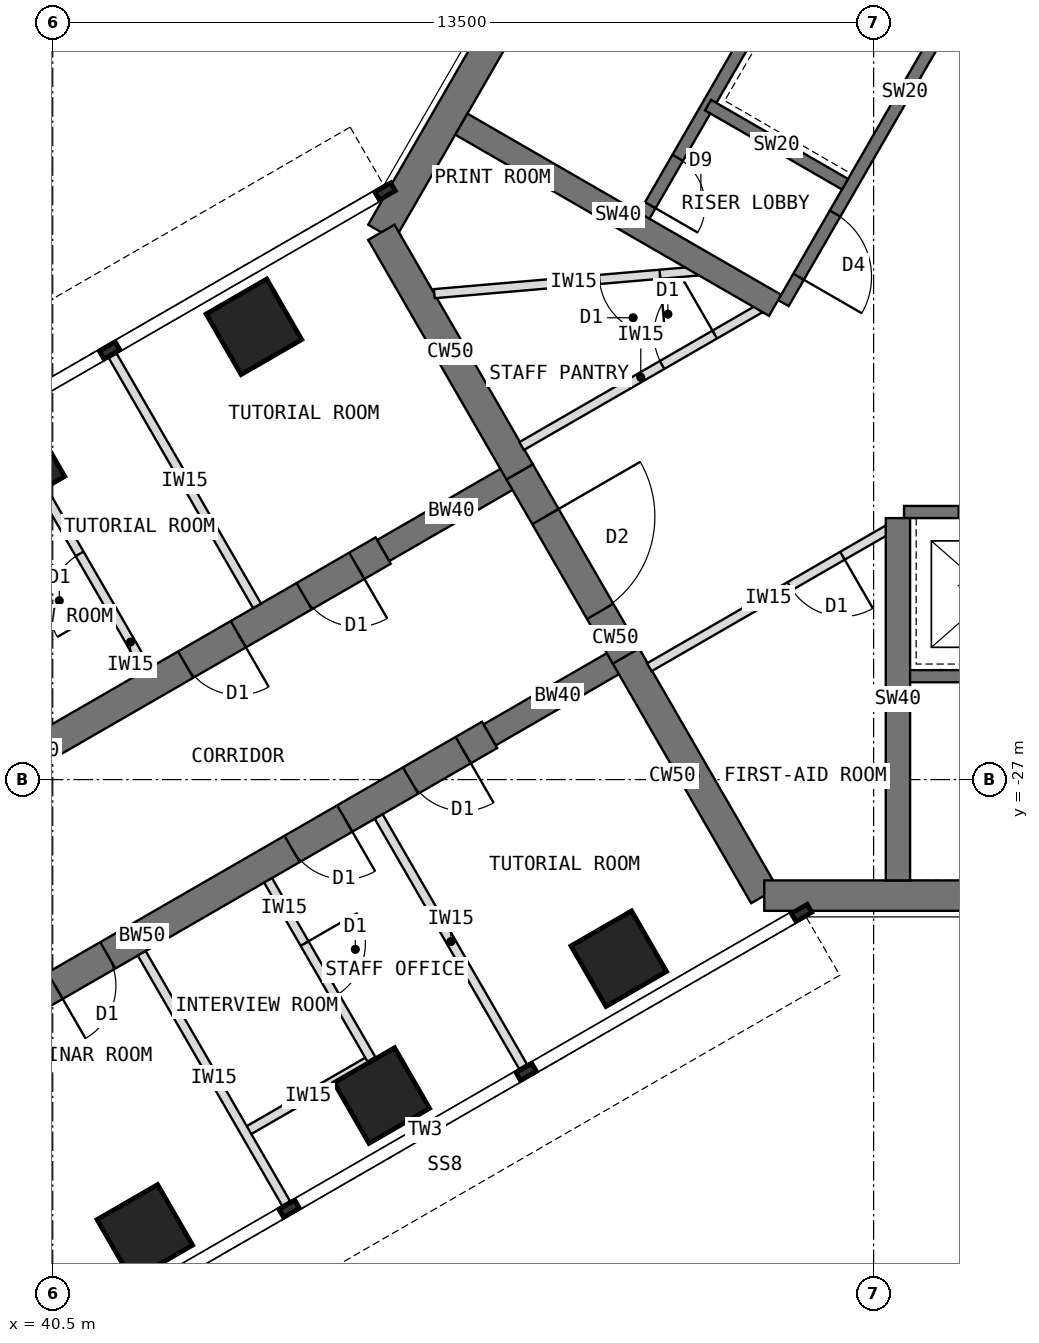
"""IFC4 building model, lengths in metres.
Left out: names, types, materials, properties, quantities, classifications, styles, units other than length and angle.
Written with IfcOpenShell. Run it as: python <this file> out.ifc"""

import sys

from ifc_helpers import new_model, si_unit, direction, frame, frame_2d, origin, origin_2d, place, context, subcontext, project, spatial, rectangle, extrude, element, fill, save


model = new_model("IFC4")
c1 = context("Model", 3, precision=1e-05, world=origin(), true_north=direction((0.0, 1.0)))
c2 = subcontext(c1, "Body", "Model", "MODEL_VIEW")
j1 = project(units=[si_unit("LENGTHUNIT", "METRE"), si_unit("PLANEANGLEUNIT", "RADIAN")], contexts=[c1])
p1 = place(None, origin())
s1 = spatial("IfcSite", under=j1, at=p1, CompositionType="ELEMENT")
p2 = place(p1, origin())
s2 = spatial("IfcBuilding", under=s1, at=p2, CompositionType="ELEMENT")
p3 = place(p2, frame((0.0, 0.0, 206.5)))
s3 = spatial("IfcBuildingStorey", under=s2, at=p3, CompositionType="ELEMENT", Elevation=206.5)
p4 = place(p3, frame((52.202, -7.092, 0.0), z_axis=(0.0, 0.0, 1.0), x_axis=(-0.500005998175, -0.866021940709, 0.0)))
e1 = element("IfcWall", 1, at=p4, inside=s3, PredefinedType="SHEAR", context=c2, shape_type="SweptSolid", body=[
    extrude(rectangle(XDim=12.596, YDim=0.5, at=frame_2d((6.298, 0.0))), origin(), (0.0, 0.0, 1.0), 4.0),
])
p5 = place(p3, frame((45.904, -18.0, 0.0), z_axis=(0.0, 0.0, 1.0), x_axis=(0.500024481964, -0.866011268655, 0.0)))
e2 = element("IfcWall", 2, at=p5, inside=s3, PredefinedType="SHEAR", context=c2, shape_type="SweptSolid", body=[
    extrude(rectangle(XDim=4.548, YDim=0.5, at=frame_2d((2.274, 0.0))), origin(), (0.0, 0.0, 1.0), 4.0),
])
p6 = place(p3, frame((48.178, -21.939, 0.0), z_axis=(0.0, 0.0, 1.0), x_axis=(0.500010275428, -0.866019471182, 0.0)))
e3 = element("IfcWall", 3, at=p6, inside=s3, PredefinedType="SHEAR", context=c2, shape_type="SweptSolid", body=[
    extrude(rectangle(XDim=3.5, YDim=0.5, at=frame_2d((1.75, 0.0))), origin(), (0.0, 0.0, 1.0), 4.0),
])
p7 = place(p6, frame((0.85, 0.0, 0.0)))
e4 = element("IfcOpeningElement", 4, at=p7, cuts=e3, PredefinedType="OPENING", context=c2, shape_type="SweptSolid", body=[
    extrude(rectangle(XDim=1.8, YDim=2.1, at=frame_2d((0.9, 1.05))), frame((0.0, 0.26, 0.0), z_axis=(0.0, -1.0, 0.0), x_axis=(1.0, 0.0, 0.0)), (0.0, 0.0, 1.0), 0.52),
])
p8 = place(p3, frame((49.928, -24.97, 0.0), z_axis=(0.0, 0.0, 1.0), x_axis=(0.499984222037, -0.866034513004, 0.0)))
e5 = element("IfcWall", 5, at=p8, inside=s3, PredefinedType="SHEAR", context=c2, shape_type="SweptSolid", body=[
    extrude(rectangle(XDim=4.548, YDim=0.5, at=frame_2d((2.274, 0.0))), origin(), (0.0, 0.0, 1.0), 4.0),
])
p9 = place(p3, frame((52.202, -28.908, 0.0), z_axis=(0.0, 0.0, 1.0), x_axis=(1.0, 0.0, 0.0)))
e6 = element("IfcWall", 6, at=p9, inside=s3, PredefinedType="SHEAR", context=c2, shape_type="SweptSolid", body=[
    extrude(rectangle(XDim=12.596, YDim=0.5, at=frame_2d((6.298, 0.0))), origin(), (0.0, 0.0, 1.0), 4.0),
])
p10 = place(p3, frame((49.928, -24.97, 0.0), z_axis=(0.0, 0.0, 1.0), x_axis=(-0.866031863473, -0.499988811324, 0.0)))
e7 = element("IfcWall", 7, at=p10, inside=s3, PredefinedType="SHEAR", context=c2, shape_type="SweptSolid", body=[
    extrude(rectangle(XDim=2.592, YDim=0.4, at=frame_2d((1.296, 0.0))), origin(), (0.0, 0.0, 1.0), 4.0),
])
p11 = place(p3, frame((47.684, -26.266, 0.0), z_axis=(0.0, 0.0, 1.0), x_axis=(-0.866027579429, -0.499996231654, 0.0)))
e8 = element("IfcWall", 8, at=p11, inside=s3, PredefinedType="SHEAR", context=c2, shape_type="SweptSolid", body=[
    extrude(rectangle(XDim=13.2, YDim=0.5, at=frame_2d((6.6, 0.0))), origin(), (0.0, 0.0, 1.0), 4.0),
])
p12 = place(p11, frame((0.5, 0.0, 0.0)))
e9 = element("IfcOpeningElement", 9, at=p12, cuts=e8, PredefinedType="OPENING", context=c2, shape_type="SweptSolid", body=[
    extrude(rectangle(XDim=1.0, YDim=2.1, at=frame_2d((0.5, 1.05))), frame((0.0, 0.26, 0.0), z_axis=(0.0, -1.0, 0.0), x_axis=(1.0, 0.0, 0.0)), (0.0, 0.0, 1.0), 0.52),
])
p13 = place(p11, frame((2.75, 0.0, 0.0)))
e10 = element("IfcOpeningElement", 10, at=p13, cuts=e8, PredefinedType="OPENING", context=c2, shape_type="SweptSolid", body=[
    extrude(rectangle(XDim=1.0, YDim=2.1, at=frame_2d((0.5, 1.05))), frame((0.0, 0.26, 0.0), z_axis=(0.0, -1.0, 0.0), x_axis=(1.0, 0.0, 0.0)), (0.0, 0.0, 1.0), 0.52),
])
p14 = place(p11, frame((7.25, 0.0, 0.0)))
e11 = element("IfcOpeningElement", 11, at=p14, cuts=e8, PredefinedType="OPENING", context=c2, shape_type="SweptSolid", body=[
    extrude(rectangle(XDim=1.0, YDim=2.1, at=frame_2d((0.5, 1.05))), frame((0.0, 0.26, 0.0), z_axis=(0.0, -1.0, 0.0), x_axis=(1.0, 0.0, 0.0)), (0.0, 0.0, 1.0), 0.52),
])
p15 = place(p3, frame((48.178, -21.939, 0.0), z_axis=(0.0, 0.0, 1.0), x_axis=(-0.866072649678, -0.499918158782, 0.0)))
e12 = element("IfcWall", 12, at=p15, inside=s3, PredefinedType="SHEAR", context=c2, shape_type="SweptSolid", body=[
    extrude(rectangle(XDim=2.592, YDim=0.4, at=frame_2d((1.296, 0.0))), origin(), (0.0, 0.0, 1.0), 4.0),
])
p16 = place(p3, frame((45.934, -23.234, 0.0), z_axis=(0.0, 0.0, 1.0), x_axis=(-0.866019570528, -0.500010103361, 0.0)))
e13 = element("IfcWall", 13, at=p16, inside=s3, PredefinedType="SHEAR", context=c2, shape_type="SweptSolid", body=[
    extrude(rectangle(XDim=13.2, YDim=0.5, at=frame_2d((6.6, 0.0))), origin(), (0.0, 0.0, 1.0), 4.0),
])
p17 = place(p16, frame((0.5, 0.0, 0.0)))
e14 = element("IfcOpeningElement", 14, at=p17, cuts=e13, PredefinedType="OPENING", context=c2, shape_type="SweptSolid", body=[
    extrude(rectangle(XDim=1.0, YDim=2.1, at=frame_2d((0.5, 1.05))), frame((0.0, 0.26, 0.0), z_axis=(0.0, -1.0, 0.0), x_axis=(1.0, 0.0, 0.0)), (0.0, 0.0, 1.0), 0.52),
])
p18 = place(p16, frame((2.75, 0.0, 0.0)))
e15 = element("IfcOpeningElement", 15, at=p18, cuts=e13, PredefinedType="OPENING", context=c2, shape_type="SweptSolid", body=[
    extrude(rectangle(XDim=1.0, YDim=2.1, at=frame_2d((0.5, 1.05))), frame((0.0, 0.26, 0.0), z_axis=(0.0, -1.0, 0.0), x_axis=(1.0, 0.0, 0.0)), (0.0, 0.0, 1.0), 0.52),
])
p19 = place(p16, frame((7.25, 0.0, 0.0)))
e16 = element("IfcOpeningElement", 16, at=p19, cuts=e13, PredefinedType="OPENING", context=c2, shape_type="SweptSolid", body=[
    extrude(rectangle(XDim=1.0, YDim=2.1, at=frame_2d((0.5, 1.05))), frame((0.0, 0.26, 0.0), z_axis=(0.0, -1.0, 0.0), x_axis=(1.0, 0.0, 0.0)), (0.0, 0.0, 1.0), 0.52),
])
for number, where, z_axis, x_axis in (
    (17, (49.809, -29.946, 0.0), (0.0, 0.0, 1.0), (0.866, 0.5, 0.0)),
    (18, (43.809, -19.554, 0.0), (0.0, 0.0, 1.0), (0.866, 0.5, 0.0)),
    (19, (45.912, -32.196, 0.0), (0.0, 0.0, 1.0), (0.866, 0.5, 0.0)),
    (20, (39.912, -21.804, 0.0), (0.0, 0.0, 1.0), (0.866, 0.5, 0.0)),
    (21, (42.014, -34.446, 0.0), (0.0, 0.0, 1.0), (0.866, 0.5, 0.0)),
):
    element("IfcColumn", number, at=place(p3, frame(where, z_axis=z_axis, x_axis=x_axis)), inside=s3, PredefinedType="COLUMN", context=c2, shape_type="SweptSolid", body=[
        extrude(rectangle(XDim=1.15, YDim=1.15, at=origin_2d()), origin(), (0.0, 0.0, 1.0), 4.0),
    ])
p20 = place(p3, frame((40.433, -36.456, 0.0), z_axis=(0.0, 0.0, 1.0), x_axis=(-0.500046648681, 0.865998469481, 0.0)))
e22 = element("IfcWall", 22, at=p20, inside=s3, PredefinedType="STANDARD", context=c2, shape_type="SweptSolid", body=[
    extrude(rectangle(XDim=2.325, YDim=0.25, at=frame_2d((1.163, 0.0))), origin(), (0.0, 0.0, 1.0), 3.8),
])
p21 = place(p3, frame((56.516, -12.236, 0.0), z_axis=(0.0, 0.0, 1.0), x_axis=(-0.49999894854, -0.866026010844, 0.0)))
e23 = element("IfcWall", 23, at=p21, inside=s3, PredefinedType="SHEAR", context=c2, shape_type="SweptSolid", body=[
    extrude(rectangle(XDim=8.0, YDim=0.2, at=frame_2d((4.0, 0.0))), origin(), (0.0, 0.0, 1.0), 4.0),
])
p22 = place(p21, frame((6.3, 0.0, 0.0)))
e24 = element("IfcOpeningElement", 24, at=p22, cuts=e23, PredefinedType="OPENING", context=c2, shape_type="SweptSolid", body=[
    extrude(rectangle(XDim=1.2, YDim=2.1, at=frame_2d((0.6, 1.05))), frame((0.0, 0.11, 0.0), z_axis=(0.0, -1.0, 0.0), x_axis=(1.0, 0.0, 0.0)), (0.0, 0.0, 1.0), 0.22),
])
p23 = place(p3, frame((53.53, -17.209, 0.0), z_axis=(0.0, 0.0, 1.0), x_axis=(-0.866062058628, 0.499936506574, 0.0)))
e25 = element("IfcWall", 25, at=p23, inside=s3, PredefinedType="SHEAR", context=c2, shape_type="SweptSolid", body=[
    extrude(rectangle(XDim=2.6, YDim=0.2, at=frame_2d((1.3, 0.0))), origin(), (0.0, 0.0, 1.0), 4.0),
])
p24 = place(p3, frame((54.178, -10.886, 0.0), z_axis=(0.0, 0.0, 1.0), x_axis=(-0.49999894854, -0.866026010844, 0.0)))
e26 = element("IfcWall", 26, at=p24, inside=s3, PredefinedType="SHEAR", context=c2, shape_type="SweptSolid", body=[
    extrude(rectangle(XDim=8.0, YDim=0.2, at=frame_2d((4.0, 0.0))), origin(), (0.0, 0.0, 1.0), 4.0),
])
p25 = place(p24, frame((6.8, 0.0, 0.0)))
e27 = element("IfcOpeningElement", 27, at=p25, cuts=e26, PredefinedType="OPENING", context=c2, shape_type="SweptSolid", body=[
    extrude(rectangle(XDim=0.9, YDim=2.1, at=frame_2d((0.45, 1.05))), frame((0.0, 0.11, 0.0), z_axis=(0.0, -1.0, 0.0), x_axis=(1.0, 0.0, 0.0)), (0.0, 0.0, 1.0), 0.22),
])
p26 = place(p3, frame((52.38, -19.201, 0.0), z_axis=(0.0, 0.0, 1.0), x_axis=(-0.866012946976, 0.500021575205, 0.0)))
e28 = element("IfcWall", 28, at=p26, inside=s3, PredefinedType="SHEAR", context=c2, shape_type="SweptSolid", body=[
    extrude(rectangle(XDim=5.958, YDim=0.4, at=frame_2d((2.979, 0.0))), origin(), (0.0, 0.0, 1.0), 4.0),
])
p27 = place(p3, frame((54.5, -22.6, 0.0), z_axis=(0.0, 0.0, 1.0), x_axis=(1.0, 0.0, 0.0)))
e29 = element("IfcWall", 29, at=p27, inside=s3, PredefinedType="SHEAR", context=c2, shape_type="SweptSolid", body=[
    extrude(rectangle(XDim=8.0, YDim=0.2, at=frame_2d((4.0, 0.0))), origin(), (0.0, 0.0, 1.0), 4.0),
])
p28 = place(p27, frame((6.3, 0.0, 0.0)))
e30 = element("IfcOpeningElement", 30, at=p28, cuts=e29, PredefinedType="OPENING", context=c2, shape_type="SweptSolid", body=[
    extrude(rectangle(XDim=1.2, YDim=2.1, at=frame_2d((0.6, 1.05))), frame((0.0, 0.11, 0.0), z_axis=(0.0, -1.0, 0.0), x_axis=(1.0, 0.0, 0.0)), (0.0, 0.0, 1.0), 0.22),
])
p29 = place(p27, frame((0.9, 0.0, 0.0)))
e31 = element("IfcOpeningElement", 31, at=p29, cuts=e29, PredefinedType="OPENING", context=c2, shape_type="SweptSolid", body=[
    extrude(rectangle(XDim=1.1, YDim=2.2, at=frame_2d((0.55, 1.1))), frame((0.0, 0.11, 0.0), z_axis=(0.0, -1.0, 0.0), x_axis=(1.0, 0.0, 0.0)), (0.0, 0.0, 1.0), 0.22),
])
p30 = place(p3, frame((54.5, -25.3, 0.0), z_axis=(0.0, 0.0, 1.0), x_axis=(1.0, 0.0, 0.0)))
e32 = element("IfcWall", 32, at=p30, inside=s3, PredefinedType="SHEAR", context=c2, shape_type="SweptSolid", body=[
    extrude(rectangle(XDim=8.0, YDim=0.2, at=frame_2d((4.0, 0.0))), origin(), (0.0, 0.0, 1.0), 4.0),
])
p31 = place(p30, frame((6.7, 0.0, 0.0)))
e33 = element("IfcOpeningElement", 33, at=p31, cuts=e32, PredefinedType="OPENING", context=c2, shape_type="SweptSolid", body=[
    extrude(rectangle(XDim=1.1, YDim=2.1, at=frame_2d((0.55, 1.05))), frame((0.0, 0.11, 0.0), z_axis=(0.0, -1.0, 0.0), x_axis=(1.0, 0.0, 0.0)), (0.0, 0.0, 1.0), 0.22),
])
p32 = place(p3, frame((54.4, -22.7, 0.0), z_axis=(0.0, 0.0, 1.0), x_axis=(0.0, -1.0, 0.0)))
e34 = element("IfcWall", 34, at=p32, inside=s3, PredefinedType="SHEAR", context=c2, shape_type="SweptSolid", body=[
    extrude(rectangle(XDim=5.958, YDim=0.4, at=frame_2d((2.979, 0.0))), origin(), (0.0, 0.0, 1.0), 4.0),
])
for number, where, z_axis, x_axis in (
    (35, (45.86, -27.607, 0.0), (0.0, 0.0, 1.0), (0.5, -0.866, 0.0)),
    (36, (41.963, -29.857, 0.0), (0.0, 0.0, 1.0), (0.5, -0.866, 0.0)),
):
    element("IfcWall", number, at=place(p3, frame(where, z_axis=z_axis, x_axis=x_axis)), inside=s3, PredefinedType="PARTITIONING", context=c2, shape_type="SweptSolid", body=[
        extrude(rectangle(XDim=4.75, YDim=0.15, at=frame_2d((2.375, 0.0))), origin(), (0.0, 0.0, 1.0), 3.8),
    ])
p33 = place(p3, frame((45.741, -31.602, 0.0), z_axis=(0.0, 0.0, 1.0), x_axis=(-0.866024647952, -0.500001309137, 0.0)))
e37 = element("IfcWall", 37, at=p33, inside=s3, PredefinedType="PARTITIONING", context=c2, shape_type="SweptSolid", body=[
    extrude(rectangle(XDim=2.4, YDim=0.15, at=frame_2d((1.2, 0.0))), origin(), (0.0, 0.0, 1.0), 3.8),
])
p34 = place(p3, frame((44.042, -28.657, 0.0), z_axis=(0.0, 0.0, 1.0), x_axis=(0.499977295307, -0.866038511948, 0.0)))
e38 = element("IfcWall", 38, at=p34, inside=s3, PredefinedType="PARTITIONING", context=c2, shape_type="SweptSolid", body=[
    extrude(rectangle(XDim=3.4, YDim=0.15, at=frame_2d((1.7, 0.0))), origin(), (0.0, 0.0, 1.0), 3.8),
])
p35 = place(p34, frame((1.2, 0.0, 0.0)))
e39 = element("IfcOpeningElement", 39, at=p35, cuts=e38, PredefinedType="OPENING", context=c2, shape_type="SweptSolid", body=[
    extrude(rectangle(XDim=1.0, YDim=2.1, at=frame_2d((0.5, 1.05))), frame((0.0, 0.085, 0.0), z_axis=(0.0, -1.0, 0.0), x_axis=(1.0, 0.0, 0.0)), (0.0, 0.0, 1.0), 0.17),
])
p36 = place(p3, frame((43.86, -24.143, 0.0), z_axis=(0.0, 0.0, 1.0), x_axis=(-0.499986429846, 0.866033238375, 0.0)))
e40 = element("IfcWall", 40, at=p36, inside=s3, PredefinedType="PARTITIONING", context=c2, shape_type="SweptSolid", body=[
    extrude(rectangle(XDim=4.75, YDim=0.15, at=frame_2d((2.375, 0.0))), origin(), (0.0, 0.0, 1.0), 3.8),
])
p37 = place(p3, frame((42.042, -25.193, 0.0), z_axis=(0.0, 0.0, 1.0), x_axis=(-0.500008388397, 0.866020560687, 0.0)))
e41 = element("IfcWall", 41, at=p37, inside=s3, PredefinedType="PARTITIONING", context=c2, shape_type="SweptSolid", body=[
    extrude(rectangle(XDim=3.4, YDim=0.15, at=frame_2d((1.7, 0.0))), origin(), (0.0, 0.0, 1.0), 3.8),
])
p38 = place(p37, frame((1.2, 0.0, 0.0)))
e42 = element("IfcOpeningElement", 42, at=p38, cuts=e41, PredefinedType="OPENING", context=c2, shape_type="SweptSolid", body=[
    extrude(rectangle(XDim=1.0, YDim=2.1, at=frame_2d((0.5, 1.05))), frame((0.0, 0.085, 0.0), z_axis=(0.0, -1.0, 0.0), x_axis=(1.0, 0.0, 0.0)), (0.0, 0.0, 1.0), 0.17),
])
p39 = place(p3, frame((54.23, -22.89, 0.0), z_axis=(0.0, 0.0, 1.0), x_axis=(-0.866006805923, -0.500032211057, 0.0)))
e43 = element("IfcWall", 43, at=p39, inside=s3, PredefinedType="PARTITIONING", context=c2, shape_type="SweptSolid", body=[
    extrude(rectangle(XDim=4.526, YDim=0.15, at=frame_2d((2.263, 0.0))), origin(), (0.0, 0.0, 1.0), 3.8),
])
p40 = place(p39, frame((0.858, 0.0, 0.0)))
e44 = element("IfcOpeningElement", 44, at=p40, cuts=e43, PredefinedType="OPENING", context=c2, shape_type="SweptSolid", body=[
    extrude(rectangle(XDim=1.0, YDim=2.1, at=frame_2d((0.5, 1.05))), frame((0.0, 0.085, 0.0), z_axis=(0.0, -1.0, 0.0), x_axis=(1.0, 0.0, 0.0)), (0.0, 0.0, 1.0), 0.17),
])
p41 = place(p3, frame((48.211, -21.515, 0.0), z_axis=(0.0, 0.0, 1.0), x_axis=(0.866043651885, 0.499968392031, 0.0)))
e45 = element("IfcWall", 45, at=p41, inside=s3, PredefinedType="PARTITIONING", context=c2, shape_type="SweptSolid", body=[
    extrude(rectangle(XDim=4.526, YDim=0.15, at=frame_2d((2.263, 0.0))), origin(), (0.0, 0.0, 1.0), 3.8),
])
p42 = place(p41, frame((2.668, 0.0, 0.0)))
e46 = element("IfcOpeningElement", 46, at=p42, cuts=e45, PredefinedType="OPENING", context=c2, shape_type="SweptSolid", body=[
    extrude(rectangle(XDim=1.0, YDim=2.1, at=frame_2d((0.5, 1.05))), frame((0.0, 0.085, 0.0), z_axis=(0.0, -1.0, 0.0), x_axis=(1.0, 0.0, 0.0)), (0.0, 0.0, 1.0), 0.17),
])
p43 = place(p3, frame((51.364, -18.614, 0.0), z_axis=(0.0, 0.0, 1.0), x_axis=(-0.996314617181, -0.085774026317, 0.0)))
e47 = element("IfcWall", 47, at=p43, inside=s3, PredefinedType="PARTITIONING", context=c2, shape_type="SweptSolid", body=[
    extrude(rectangle(XDim=4.605, YDim=0.15, at=frame_2d((2.303, 0.0))), origin(), (0.0, 0.0, 1.0), 3.8),
])
p44 = place(p43, frame((0.882, 0.0, 0.0)))
e48 = element("IfcOpeningElement", 48, at=p44, cuts=e47, PredefinedType="OPENING", context=c2, shape_type="SweptSolid", body=[
    extrude(rectangle(XDim=1.0, YDim=2.1, at=frame_2d((0.5, 1.05))), frame((0.0, 0.085, 0.0), z_axis=(0.0, -1.0, 0.0), x_axis=(1.0, 0.0, 0.0)), (0.0, 0.0, 1.0), 0.17),
])
p45 = place(p22, origin())
e49 = element("IfcDoor", 49, at=p45, inside=s3, OperationType="SINGLE_SWING_RIGHT", PredefinedType="DOOR", context=c2, shape_type="SweptSolid", body=[
    extrude(rectangle(XDim=1.2, YDim=2.1, at=frame_2d((0.6, 1.05))), frame((0.0, 0.025, 0.0), z_axis=(0.0, -1.0, 0.0), x_axis=(1.0, 0.0, 0.0)), (0.0, 0.0, 1.0), 0.05),
])
fill(e24, e49)
p46 = place(p25, origin())
e50 = element("IfcDoor", 50, at=p46, inside=s3, OperationType="SINGLE_SWING_RIGHT", PredefinedType="DOOR", context=c2, shape_type="SweptSolid", body=[
    extrude(rectangle(XDim=0.9, YDim=2.1, at=frame_2d((0.45, 1.05))), frame((0.0, 0.025, 0.0), z_axis=(0.0, -1.0, 0.0), x_axis=(1.0, 0.0, 0.0)), (0.0, 0.0, 1.0), 0.05),
])
fill(e27, e50)
p47 = place(p7, origin())
e51 = element("IfcDoor", 51, at=p47, inside=s3, OperationType="DOUBLE_DOOR_DOUBLE_SWING", PredefinedType="DOOR", context=c2, shape_type="SweptSolid", body=[
    extrude(rectangle(XDim=1.8, YDim=2.1, at=frame_2d((0.9, 1.05))), frame((0.0, 0.025, 0.0), z_axis=(0.0, -1.0, 0.0), x_axis=(1.0, 0.0, 0.0)), (0.0, 0.0, 1.0), 0.05),
])
fill(e4, e51)
p48 = place(p35, origin())
e52 = element("IfcDoor", 52, at=p48, inside=s3, OperationType="SINGLE_SWING_LEFT", PredefinedType="DOOR", context=c2, shape_type="SweptSolid", body=[
    extrude(rectangle(XDim=1.0, YDim=2.1, at=frame_2d((0.5, 1.05))), frame((0.0, 0.025, 0.0), z_axis=(0.0, -1.0, 0.0), x_axis=(1.0, 0.0, 0.0)), (0.0, 0.0, 1.0), 0.05),
])
fill(e39, e52)
p49 = place(p38, origin())
e53 = element("IfcDoor", 53, at=p49, inside=s3, OperationType="SINGLE_SWING_LEFT", PredefinedType="DOOR", context=c2, shape_type="SweptSolid", body=[
    extrude(rectangle(XDim=1.0, YDim=2.1, at=frame_2d((0.5, 1.05))), frame((0.0, 0.025, 0.0), z_axis=(0.0, -1.0, 0.0), x_axis=(1.0, 0.0, 0.0)), (0.0, 0.0, 1.0), 0.05),
])
fill(e42, e53)
p50 = place(p44, origin())
e54 = element("IfcDoor", 54, at=p50, inside=s3, OperationType="SINGLE_SWING_LEFT", PredefinedType="DOOR", context=c2, shape_type="SweptSolid", body=[
    extrude(rectangle(XDim=1.0, YDim=2.1, at=frame_2d((0.5, 1.05))), frame((0.0, 0.025, 0.0), z_axis=(0.0, -1.0, 0.0), x_axis=(1.0, 0.0, 0.0)), (0.0, 0.0, 1.0), 0.05),
])
fill(e48, e54)
p51 = place(p42, origin())
e55 = element("IfcDoor", 55, at=p51, inside=s3, OperationType="SINGLE_SWING_RIGHT", PredefinedType="DOOR", context=c2, shape_type="SweptSolid", body=[
    extrude(rectangle(XDim=1.0, YDim=2.1, at=frame_2d((0.5, 1.05))), frame((0.0, 0.025, 0.0), z_axis=(0.0, -1.0, 0.0), x_axis=(1.0, 0.0, 0.0)), (0.0, 0.0, 1.0), 0.05),
])
fill(e46, e55)
p52 = place(p40, origin())
e56 = element("IfcDoor", 56, at=p52, inside=s3, OperationType="SINGLE_SWING_LEFT", PredefinedType="DOOR", context=c2, shape_type="SweptSolid", body=[
    extrude(rectangle(XDim=1.0, YDim=2.1, at=frame_2d((0.5, 1.05))), frame((0.0, 0.025, 0.0), z_axis=(0.0, -1.0, 0.0), x_axis=(1.0, 0.0, 0.0)), (0.0, 0.0, 1.0), 0.05),
])
fill(e44, e56)
p53 = place(p12, origin())
e57 = element("IfcDoor", 57, at=p53, inside=s3, OperationType="SINGLE_SWING_LEFT", PredefinedType="DOOR", context=c2, shape_type="SweptSolid", body=[
    extrude(rectangle(XDim=1.0, YDim=2.1, at=frame_2d((0.5, 1.05))), frame((0.0, 0.025, 0.0), z_axis=(0.0, -1.0, 0.0), x_axis=(1.0, 0.0, 0.0)), (0.0, 0.0, 1.0), 0.05),
])
fill(e9, e57)
p54 = place(p13, origin())
e58 = element("IfcDoor", 58, at=p54, inside=s3, OperationType="SINGLE_SWING_LEFT", PredefinedType="DOOR", context=c2, shape_type="SweptSolid", body=[
    extrude(rectangle(XDim=1.0, YDim=2.1, at=frame_2d((0.5, 1.05))), frame((0.0, 0.025, 0.0), z_axis=(0.0, -1.0, 0.0), x_axis=(1.0, 0.0, 0.0)), (0.0, 0.0, 1.0), 0.05),
])
fill(e10, e58)
p55 = place(p14, origin())
e59 = element("IfcDoor", 59, at=p55, inside=s3, OperationType="SINGLE_SWING_RIGHT", PredefinedType="DOOR", context=c2, shape_type="SweptSolid", body=[
    extrude(rectangle(XDim=1.0, YDim=2.1, at=frame_2d((0.5, 1.05))), frame((0.0, 0.025, 0.0), z_axis=(0.0, -1.0, 0.0), x_axis=(1.0, 0.0, 0.0)), (0.0, 0.0, 1.0), 0.05),
])
fill(e11, e59)
p56 = place(p17, origin())
e60 = element("IfcDoor", 60, at=p56, inside=s3, OperationType="SINGLE_SWING_LEFT", PredefinedType="DOOR", context=c2, shape_type="SweptSolid", body=[
    extrude(rectangle(XDim=1.0, YDim=2.1, at=frame_2d((0.5, 1.05))), frame((0.0, 0.025, 0.0), z_axis=(0.0, -1.0, 0.0), x_axis=(1.0, 0.0, 0.0)), (0.0, 0.0, 1.0), 0.05),
])
fill(e14, e60)
p57 = place(p18, origin())
e61 = element("IfcDoor", 61, at=p57, inside=s3, OperationType="SINGLE_SWING_LEFT", PredefinedType="DOOR", context=c2, shape_type="SweptSolid", body=[
    extrude(rectangle(XDim=1.0, YDim=2.1, at=frame_2d((0.5, 1.05))), frame((0.0, 0.025, 0.0), z_axis=(0.0, -1.0, 0.0), x_axis=(1.0, 0.0, 0.0)), (0.0, 0.0, 1.0), 0.05),
])
fill(e15, e61)
save(model, sys.argv[1])
